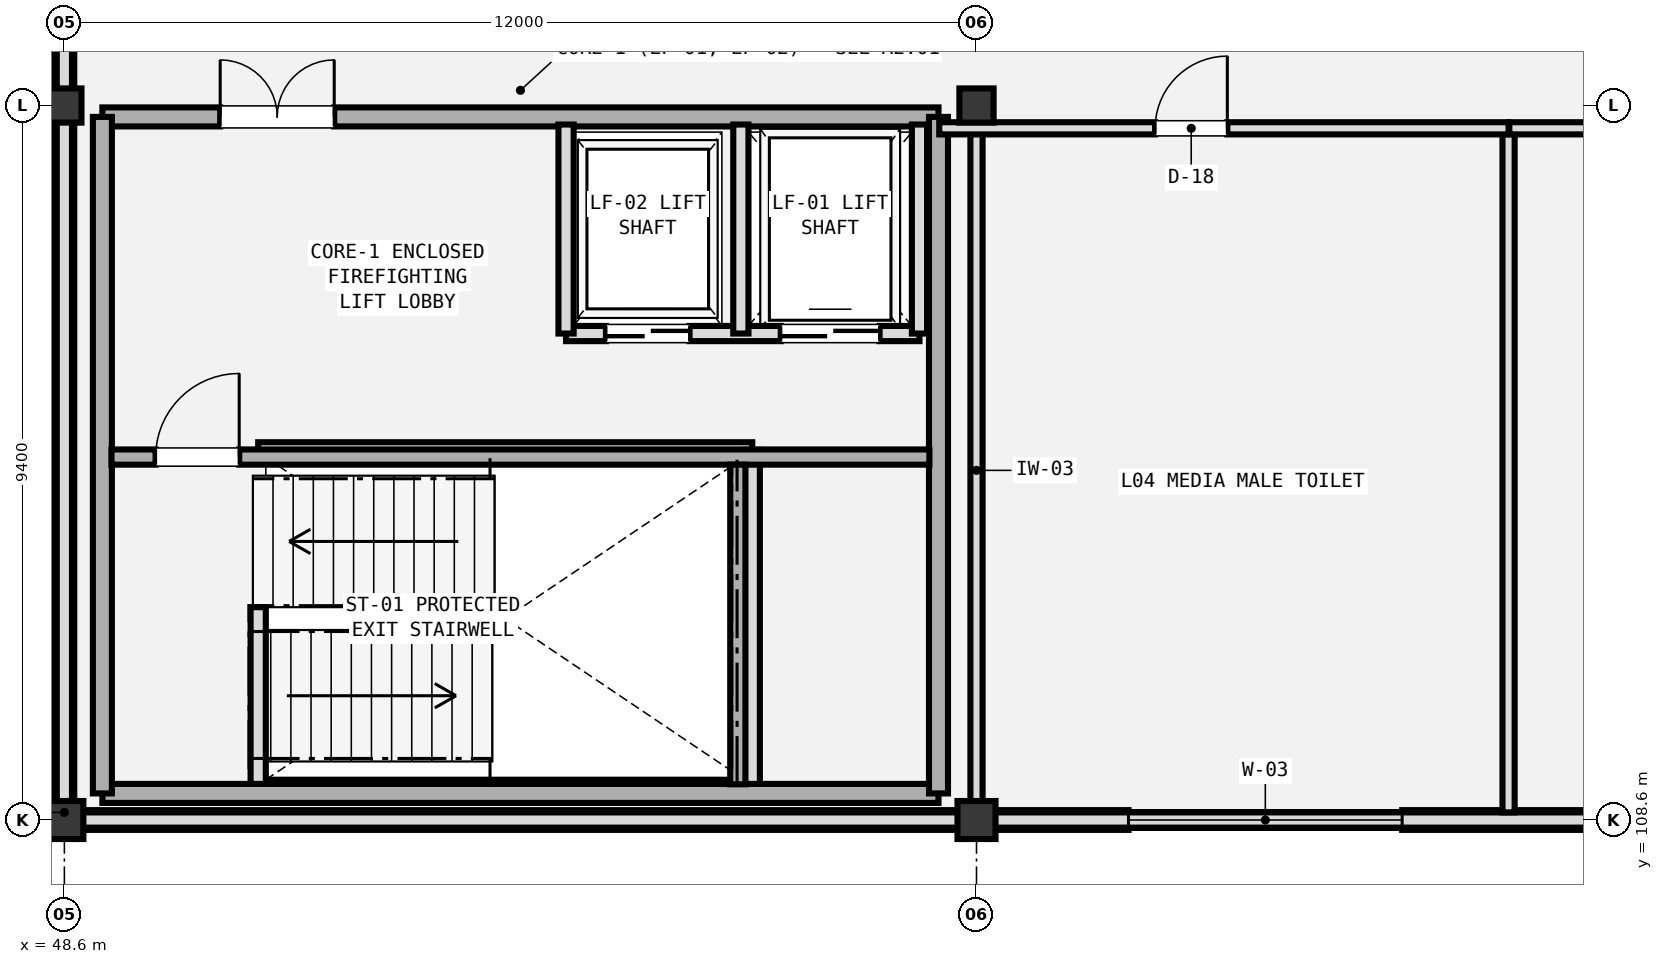
"""IFC4 building model, lengths in metres.
Left out: names, types, materials, properties, quantities, classifications, styles, units other than length and angle.
Written with IfcOpenShell. Run it as: python <this file> out.ifc"""

import sys

from ifc_helpers import new_model, si_unit, direction, frame, frame_2d, origin, origin_2d, place, context, subcontext, project, spatial, rectangle, extrude, element, fill, save


model = new_model("IFC4")
c1 = context("Model", 3, precision=1e-05, world=origin(), true_north=direction((0.0, 1.0)))
c2 = subcontext(c1, "Body", "Model", "MODEL_VIEW")
j1 = project(units=[si_unit("LENGTHUNIT", "METRE"), si_unit("PLANEANGLEUNIT", "RADIAN")], contexts=[c1])
p1 = place(None, origin())
s1 = spatial("IfcSite", under=j1, at=p1, CompositionType="ELEMENT")
p2 = place(p1, origin())
s2 = spatial("IfcBuilding", under=s1, at=p2, CompositionType="ELEMENT")
p3 = place(p2, frame((0.0, 0.0, 18.6)))
s3 = spatial("IfcBuildingStorey", under=s2, at=p3, CompositionType="ELEMENT", Elevation=18.6)
p4 = place(p3, frame((48.6, 108.6, 0.0), z_axis=(0.0, 0.0, 1.0), x_axis=(1.0, 0.0, 0.0)))
e1 = element("IfcColumn", 1, at=p4, inside=s3, PredefinedType="COLUMN", context=c2, shape_type="SweptSolid", body=[
    extrude(rectangle(XDim=0.5, YDim=0.5, at=origin_2d()), origin(), (0.0, 0.0, 1.0), 3.88),
])
p5 = place(p3, frame((48.6, 118.0, 0.0), z_axis=(0.0, 0.0, 1.0), x_axis=(1.0, 0.0, 0.0)))
e2 = element("IfcColumn", 2, at=p5, inside=s3, PredefinedType="COLUMN", context=c2, shape_type="SweptSolid", body=[
    extrude(rectangle(XDim=0.45, YDim=0.45, at=origin_2d()), origin(), (0.0, 0.0, 1.0), 3.88),
])
p6 = place(p3, frame((60.6, 108.6, 0.0), z_axis=(0.0, 0.0, 1.0), x_axis=(1.0, 0.0, 0.0)))
e3 = element("IfcColumn", 3, at=p6, inside=s3, PredefinedType="COLUMN", context=c2, shape_type="SweptSolid", body=[
    extrude(rectangle(XDim=0.5, YDim=0.5, at=origin_2d()), origin(), (0.0, 0.0, 1.0), 3.88),
])
p7 = place(p3, frame((60.6, 118.0, 0.0), z_axis=(0.0, 0.0, 1.0), x_axis=(1.0, 0.0, 0.0)))
e4 = element("IfcColumn", 4, at=p7, inside=s3, PredefinedType="COLUMN", context=c2, shape_type="SweptSolid", body=[
    extrude(rectangle(XDim=0.45, YDim=0.45, at=origin_2d()), origin(), (0.0, 0.0, 1.0), 3.88),
])
p8 = place(p3, frame((48.6, 108.6, 0.0), z_axis=(0.0, 0.0, 1.0), x_axis=(1.0, 0.0, 0.0)))
e5 = element("IfcWall", 5, at=p8, inside=s3, PredefinedType="SOLIDWALL", context=c2, shape_type="SweptSolid", body=[
    extrude(rectangle(XDim=48.0, YDim=0.26, at=frame_2d((24.0, 0.0))), origin(), (0.0, 0.0, 1.0), 3.43),
])
p9 = place(p8, frame((14.0, 0.0, 0.85)))
e6 = element("IfcOpeningElement", 6, at=p9, cuts=e5, PredefinedType="OPENING", context=c2, shape_type="SweptSolid", body=[
    extrude(rectangle(XDim=3.6, YDim=1.2, at=frame_2d((1.8, 0.6))), frame((0.0, 0.14, 0.0), z_axis=(0.0, -1.0, 0.0), x_axis=(1.0, 0.0, 0.0)), (0.0, 0.0, 1.0), 0.28),
])
p10 = place(p8, frame((28.0, 0.0, 0.85)))
e7 = element("IfcOpeningElement", 7, at=p10, cuts=e5, PredefinedType="OPENING", context=c2, shape_type="SweptSolid", body=[
    extrude(rectangle(XDim=2.8, YDim=1.2, at=frame_2d((1.4, 0.6))), frame((0.0, 0.14, 0.0), z_axis=(0.0, -1.0, 0.0), x_axis=(1.0, 0.0, 0.0)), (0.0, 0.0, 1.0), 0.28),
])
p11 = place(p3, frame((48.6, 108.6, 0.0), z_axis=(0.0, 0.0, 1.0), x_axis=(0.0, 1.0, 0.0)))
e8 = element("IfcWall", 8, at=p11, inside=s3, PredefinedType="SOLIDWALL", context=c2, shape_type="SweptSolid", body=[
    extrude(rectangle(XDim=27.4, YDim=0.26, at=frame_2d((13.7, 0.0))), origin(), (0.0, 0.0, 1.0), 3.43),
])
p12 = place(p11, frame((13.4, 0.0, 0.0)))
e9 = element("IfcOpeningElement", 9, at=p12, cuts=e8, PredefinedType="OPENING", context=c2, shape_type="SweptSolid", body=[
    extrude(rectangle(XDim=1.5, YDim=2.2, at=frame_2d((0.75, 1.1))), frame((0.0, 0.14, 0.0), z_axis=(0.0, -1.0, 0.0), x_axis=(1.0, 0.0, 0.0)), (0.0, 0.0, 1.0), 0.28),
])
p13 = place(p11, frame((15.5, 0.0, 0.85)))
e10 = element("IfcOpeningElement", 10, at=p13, cuts=e8, PredefinedType="OPENING", context=c2, shape_type="SweptSolid", body=[
    extrude(rectangle(XDim=2.4, YDim=1.5, at=frame_2d((1.2, 0.75))), frame((0.0, 0.14, 0.0), z_axis=(0.0, -1.0, 0.0), x_axis=(1.0, 0.0, 0.0)), (0.0, 0.0, 1.0), 0.28),
])
p14 = place(p11, frame((21.5, 0.0, 0.85)))
e11 = element("IfcOpeningElement", 11, at=p14, cuts=e8, PredefinedType="OPENING", context=c2, shape_type="SweptSolid", body=[
    extrude(rectangle(XDim=2.4, YDim=1.5, at=frame_2d((1.2, 0.75))), frame((0.0, 0.14, 0.0), z_axis=(0.0, -1.0, 0.0), x_axis=(1.0, 0.0, 0.0)), (0.0, 0.0, 1.0), 0.28),
])
p15 = place(p3, frame((48.6, 108.6, 4.2), z_axis=(0.0, 0.0, 1.0), x_axis=(1.0, 0.0, 0.0)))
e12 = element("IfcWall", 12, at=p15, inside=s3, PredefinedType="PARAPET", context=c2, shape_type="SweptSolid", body=[
    extrude(rectangle(XDim=48.0, YDim=0.2, at=frame_2d((24.0, 0.0))), origin(), (0.0, 0.0, 1.0), 1.15),
])
p16 = place(p3, frame((48.6, 108.6, 4.2), z_axis=(0.0, 0.0, 1.0), x_axis=(0.0, 1.0, 0.0)))
e13 = element("IfcWall", 13, at=p16, inside=s3, PredefinedType="PARAPET", context=c2, shape_type="SweptSolid", body=[
    extrude(rectangle(XDim=27.4, YDim=0.2, at=frame_2d((13.7, 0.0))), origin(), (0.0, 0.0, 1.0), 1.15),
])
for number, where, z_axis, x_axis in (
    (14, (51.15, 109.03, 4.2), (0.0, 0.0, 1.0), (1.0, 0.0, 0.0)),
    (15, (51.15, 113.47, 4.2), (0.0, 0.0, 1.0), (1.0, 0.0, 0.0)),
):
    element("IfcWall", number, at=place(p3, frame(where, z_axis=z_axis, x_axis=x_axis)), inside=s3, PredefinedType="PARAPET", context=c2, shape_type="SweptSolid", body=[
        extrude(rectangle(XDim=6.5, YDim=0.2, at=frame_2d((3.25, 0.0))), origin(), (0.0, 0.0, 1.0), 1.15),
    ])
p17 = place(p3, frame((57.65, 109.03, 4.2), z_axis=(0.0, 0.0, 1.0), x_axis=(0.0, 1.0, 0.0)))
e16 = element("IfcWall", 16, at=p17, inside=s3, PredefinedType="PARAPET", context=c2, shape_type="SweptSolid", body=[
    extrude(rectangle(XDim=4.44, YDim=0.2, at=frame_2d((2.22, 0.0))), origin(), (0.0, 0.0, 1.0), 1.15),
])
p18 = place(p3, frame((51.15, 109.03, 4.2), z_axis=(0.0, 0.0, 1.0), x_axis=(0.0, 1.0, 0.0)))
e17 = element("IfcWall", 17, at=p18, inside=s3, PredefinedType="PARAPET", context=c2, shape_type="SweptSolid", body=[
    extrude(rectangle(XDim=2.37, YDim=0.2, at=frame_2d((1.185, 0.0))), origin(), (0.0, 0.0, 1.0), 1.15),
])
p19 = place(p3, frame((49.1, 108.95, 0.0), z_axis=(0.0, 0.0, 1.0), x_axis=(1.0, 0.0, 0.0)))
e18 = element("IfcWall", 18, at=p19, inside=s3, PredefinedType="SHEAR", context=c2, shape_type="SweptSolid", body=[
    extrude(rectangle(XDim=11.0, YDim=0.25, at=frame_2d((5.5, 0.0))), origin(), (0.0, 0.0, 1.0), 3.88),
])
p20 = place(p3, frame((49.1, 117.85, 0.0), z_axis=(0.0, 0.0, 1.0), x_axis=(1.0, 0.0, 0.0)))
e19 = element("IfcWall", 19, at=p20, inside=s3, PredefinedType="SHEAR", context=c2, shape_type="SweptSolid", body=[
    extrude(rectangle(XDim=11.0, YDim=0.25, at=frame_2d((5.5, 0.0))), origin(), (0.0, 0.0, 1.0), 3.88),
])
p21 = place(p20, frame((1.55, 0.0, 0.0)))
e20 = element("IfcOpeningElement", 20, at=p21, cuts=e19, PredefinedType="OPENING", context=c2, shape_type="SweptSolid", body=[
    extrude(rectangle(XDim=1.5, YDim=2.2, at=frame_2d((0.75, 1.1))), frame((0.0, 0.135, 0.0), z_axis=(0.0, -1.0, 0.0), x_axis=(1.0, 0.0, 0.0)), (0.0, 0.0, 1.0), 0.27),
])
for number, where, z_axis, x_axis in (
    (21, (49.1, 108.95, 0.0), (0.0, 0.0, 1.0), (0.0, 1.0, 0.0)),
    (22, (60.1, 108.95, 0.0), (0.0, 0.0, 1.0), (0.0, 1.0, 0.0)),
):
    element("IfcWall", number, at=place(p3, frame(where, z_axis=z_axis, x_axis=x_axis)), inside=s3, PredefinedType="SHEAR", context=c2, shape_type="SweptSolid", body=[
        extrude(rectangle(XDim=8.9, YDim=0.25, at=frame_2d((4.45, 0.0))), origin(), (0.0, 0.0, 1.0), 3.88),
    ])
p22 = place(p3, frame((49.22, 113.375, 0.0), z_axis=(0.0, 0.0, 1.0), x_axis=(1.0, 0.0, 0.0)))
e23 = element("IfcWall", 23, at=p22, inside=s3, PredefinedType="SHEAR", context=c2, shape_type="SweptSolid", body=[
    extrude(rectangle(XDim=10.76, YDim=0.2, at=frame_2d((5.38, 0.0))), origin(), (0.0, 0.0, 1.0), 3.88),
])
p23 = place(p22, frame((0.58, 0.0, 0.0)))
e24 = element("IfcOpeningElement", 24, at=p23, cuts=e23, PredefinedType="OPENING", context=c2, shape_type="SweptSolid", body=[
    extrude(rectangle(XDim=1.1, YDim=2.2, at=frame_2d((0.55, 1.1))), frame((0.0, 0.11, 0.0), z_axis=(0.0, -1.0, 0.0), x_axis=(1.0, 0.0, 0.0)), (0.0, 0.0, 1.0), 0.22),
])
p24 = place(p3, frame((57.46, 109.07, 0.0), z_axis=(0.0, 0.0, 1.0), x_axis=(0.0, 1.0, 0.0)))
e25 = element("IfcWall", 25, at=p24, inside=s3, PredefinedType="SHEAR", context=c2, shape_type="SweptSolid", body=[
    extrude(rectangle(XDim=4.205, YDim=0.2, at=frame_2d((2.103, 0.0))), origin(), (0.0, 0.0, 1.0), 3.88),
])
p25 = place(p3, frame((55.2, 115.0, 0.0), z_axis=(0.0, 0.0, 1.0), x_axis=(1.0, 0.0, 0.0)))
e26 = element("IfcWall", 26, at=p25, inside=s3, PredefinedType="SOLIDWALL", context=c2, shape_type="SweptSolid", body=[
    extrude(rectangle(XDim=4.65, YDim=0.2, at=frame_2d((2.325, 0.0))), origin(), (0.0, 0.0, 1.0), 3.88),
])
p26 = place(p25, frame((2.825, 0.0, 0.0)))
e27 = element("IfcOpeningElement", 27, at=p26, cuts=e26, PredefinedType="OPENING", context=c2, shape_type="SweptSolid", body=[
    extrude(rectangle(XDim=1.3, YDim=2.3, at=frame_2d((0.65, 1.15))), frame((0.0, 0.11, 0.0), z_axis=(0.0, -1.0, 0.0), x_axis=(1.0, 0.0, 0.0)), (0.0, 0.0, 1.0), 0.22),
])
p27 = place(p25, frame((0.525, 0.0, 0.0)))
e28 = element("IfcOpeningElement", 28, at=p27, cuts=e26, PredefinedType="OPENING", context=c2, shape_type="SweptSolid", body=[
    extrude(rectangle(XDim=1.1, YDim=2.2, at=frame_2d((0.55, 1.1))), frame((0.0, 0.11, 0.0), z_axis=(0.0, -1.0, 0.0), x_axis=(1.0, 0.0, 0.0)), (0.0, 0.0, 1.0), 0.22),
])
for number, where, z_axis, x_axis in (
    (29, (57.5, 115.0, 0.0), (0.0, 0.0, 1.0), (0.0, 1.0, 0.0)),
    (30, (59.85, 115.0, 0.0), (0.0, 0.0, 1.0), (0.0, 1.0, 0.0)),
    (31, (55.2, 115.0, 0.0), (0.0, 0.0, 1.0), (0.0, 1.0, 0.0)),
):
    element("IfcWall", number, at=place(p3, frame(where, z_axis=z_axis, x_axis=x_axis)), inside=s3, PredefinedType="SOLIDWALL", context=c2, shape_type="SweptSolid", body=[
        extrude(rectangle(XDim=2.75, YDim=0.2, at=frame_2d((1.375, 0.0))), origin(), (0.0, 0.0, 1.0), 3.88),
    ])
for number, where, z_axis, x_axis in (
    (32, (60.6, 108.7, 0.0), (0.0, 0.0, 1.0), (0.0, 1.0, 0.0)),
    (33, (67.6, 108.7, 0.0), (0.0, 0.0, 1.0), (0.0, 1.0, 0.0)),
):
    element("IfcWall", number, at=place(p3, frame(where, z_axis=z_axis, x_axis=x_axis)), inside=s3, PredefinedType="PLUMBINGWALL", context=c2, shape_type="SweptSolid", body=[
        extrude(rectangle(XDim=9.0, YDim=0.16, at=frame_2d((4.5, 0.0))), origin(), (0.0, 0.0, 1.0), 3.25),
    ])
p28 = place(p3, frame((60.11, 117.7, 0.0), z_axis=(0.0, 0.0, 1.0), x_axis=(1.0, 0.0, 0.0)))
e34 = element("IfcWall", 34, at=p28, inside=s3, PredefinedType="PLUMBINGWALL", context=c2, shape_type="SweptSolid", body=[
    extrude(rectangle(XDim=7.49, YDim=0.16, at=frame_2d((3.745, 0.0))), origin(), (0.0, 0.0, 1.0), 3.25),
])
p29 = place(p28, frame((2.84, 0.0, 0.0)))
e35 = element("IfcOpeningElement", 35, at=p29, cuts=e34, PredefinedType="OPENING", context=c2, shape_type="SweptSolid", body=[
    extrude(rectangle(XDim=0.95, YDim=2.15, at=frame_2d((0.475, 1.075))), frame((0.0, 0.09, 0.0), z_axis=(0.0, -1.0, 0.0), x_axis=(1.0, 0.0, 0.0)), (0.0, 0.0, 1.0), 0.18),
])
p30 = place(p3, frame((67.61, 117.7, 0.0), z_axis=(0.0, 0.0, 1.0), x_axis=(1.0, 0.0, 0.0)))
e36 = element("IfcWall", 36, at=p30, inside=s3, PredefinedType="PLUMBINGWALL", context=c2, shape_type="SweptSolid", body=[
    extrude(rectangle(XDim=7.39, YDim=0.16, at=frame_2d((3.695, 0.0))), origin(), (0.0, 0.0, 1.0), 3.25),
])
p31 = place(p30, frame((2.99, 0.0, 0.0)))
e37 = element("IfcOpeningElement", 37, at=p31, cuts=e36, PredefinedType="OPENING", context=c2, shape_type="SweptSolid", body=[
    extrude(rectangle(XDim=0.95, YDim=2.15, at=frame_2d((0.475, 1.075))), frame((0.0, 0.09, 0.0), z_axis=(0.0, -1.0, 0.0), x_axis=(1.0, 0.0, 0.0)), (0.0, 0.0, 1.0), 0.18),
])
p32 = place(p9, frame((3.6, 0.0, 0.0), z_axis=(0.0, 0.0, 1.0), x_axis=(-1.0, 0.0, 0.0)))
e38 = element("IfcWindow", 38, at=p32, inside=s3, PartitioningType="TRIPLE_PANEL_HORIZONTAL", PredefinedType="WINDOW", context=c2, shape_type="SweptSolid", body=[
    extrude(rectangle(XDim=3.6, YDim=1.2, at=frame_2d((1.8, 0.6))), frame((0.0, 0.03, 0.0), z_axis=(0.0, -1.0, 0.0), x_axis=(1.0, 0.0, 0.0)), (0.0, 0.0, 1.0), 0.06),
])
fill(e6, e38)
p33 = place(p21, origin())
e39 = element("IfcDoor", 39, at=p33, inside=s3, OperationType="DOUBLE_DOOR_SINGLE_SWING", PredefinedType="DOOR", context=c2, shape_type="SweptSolid", body=[
    extrude(rectangle(XDim=1.5, YDim=2.2, at=frame_2d((0.75, 1.1))), frame((0.0, 0.025, 0.0), z_axis=(0.0, -1.0, 0.0), x_axis=(1.0, 0.0, 0.0)), (0.0, 0.0, 1.0), 0.05),
])
fill(e20, e39)
p34 = place(p23, origin())
e40 = element("IfcDoor", 40, at=p34, inside=s3, OperationType="SINGLE_SWING_RIGHT", PredefinedType="DOOR", context=c2, shape_type="SweptSolid", body=[
    extrude(rectangle(XDim=1.1, YDim=2.2, at=frame_2d((0.55, 1.1))), frame((0.0, 0.025, 0.0), z_axis=(0.0, -1.0, 0.0), x_axis=(1.0, 0.0, 0.0)), (0.0, 0.0, 1.0), 0.05),
])
fill(e24, e40)
p35 = place(p26, frame((1.3, 0.0, 0.0), z_axis=(0.0, 0.0, 1.0), x_axis=(-1.0, 0.0, 0.0)))
e41 = element("IfcDoor", 41, at=p35, inside=s3, OperationType="DOUBLE_DOOR_SLIDING", PredefinedType="DOOR", context=c2, shape_type="SweptSolid", body=[
    extrude(rectangle(XDim=1.3, YDim=2.3, at=frame_2d((0.65, 1.15))), frame((0.0, 0.025, 0.0), z_axis=(0.0, -1.0, 0.0), x_axis=(1.0, 0.0, 0.0)), (0.0, 0.0, 1.0), 0.05),
])
fill(e27, e41)
p36 = place(p27, frame((1.1, 0.0, 0.0), z_axis=(0.0, 0.0, 1.0), x_axis=(-1.0, 0.0, 0.0)))
e42 = element("IfcDoor", 42, at=p36, inside=s3, OperationType="DOUBLE_DOOR_SLIDING", PredefinedType="DOOR", context=c2, shape_type="SweptSolid", body=[
    extrude(rectangle(XDim=1.1, YDim=2.2, at=frame_2d((0.55, 1.1))), frame((0.0, 0.025, 0.0), z_axis=(0.0, -1.0, 0.0), x_axis=(1.0, 0.0, 0.0)), (0.0, 0.0, 1.0), 0.05),
])
fill(e28, e42)
p37 = place(p29, origin())
e43 = element("IfcDoor", 43, at=p37, inside=s3, OperationType="SINGLE_SWING_RIGHT", PredefinedType="DOOR", context=c2, shape_type="SweptSolid", body=[
    extrude(rectangle(XDim=0.95, YDim=2.15, at=frame_2d((0.475, 1.075))), frame((0.0, 0.025, 0.0), z_axis=(0.0, -1.0, 0.0), x_axis=(1.0, 0.0, 0.0)), (0.0, 0.0, 1.0), 0.05),
])
fill(e35, e43)
save(model, sys.argv[1])
